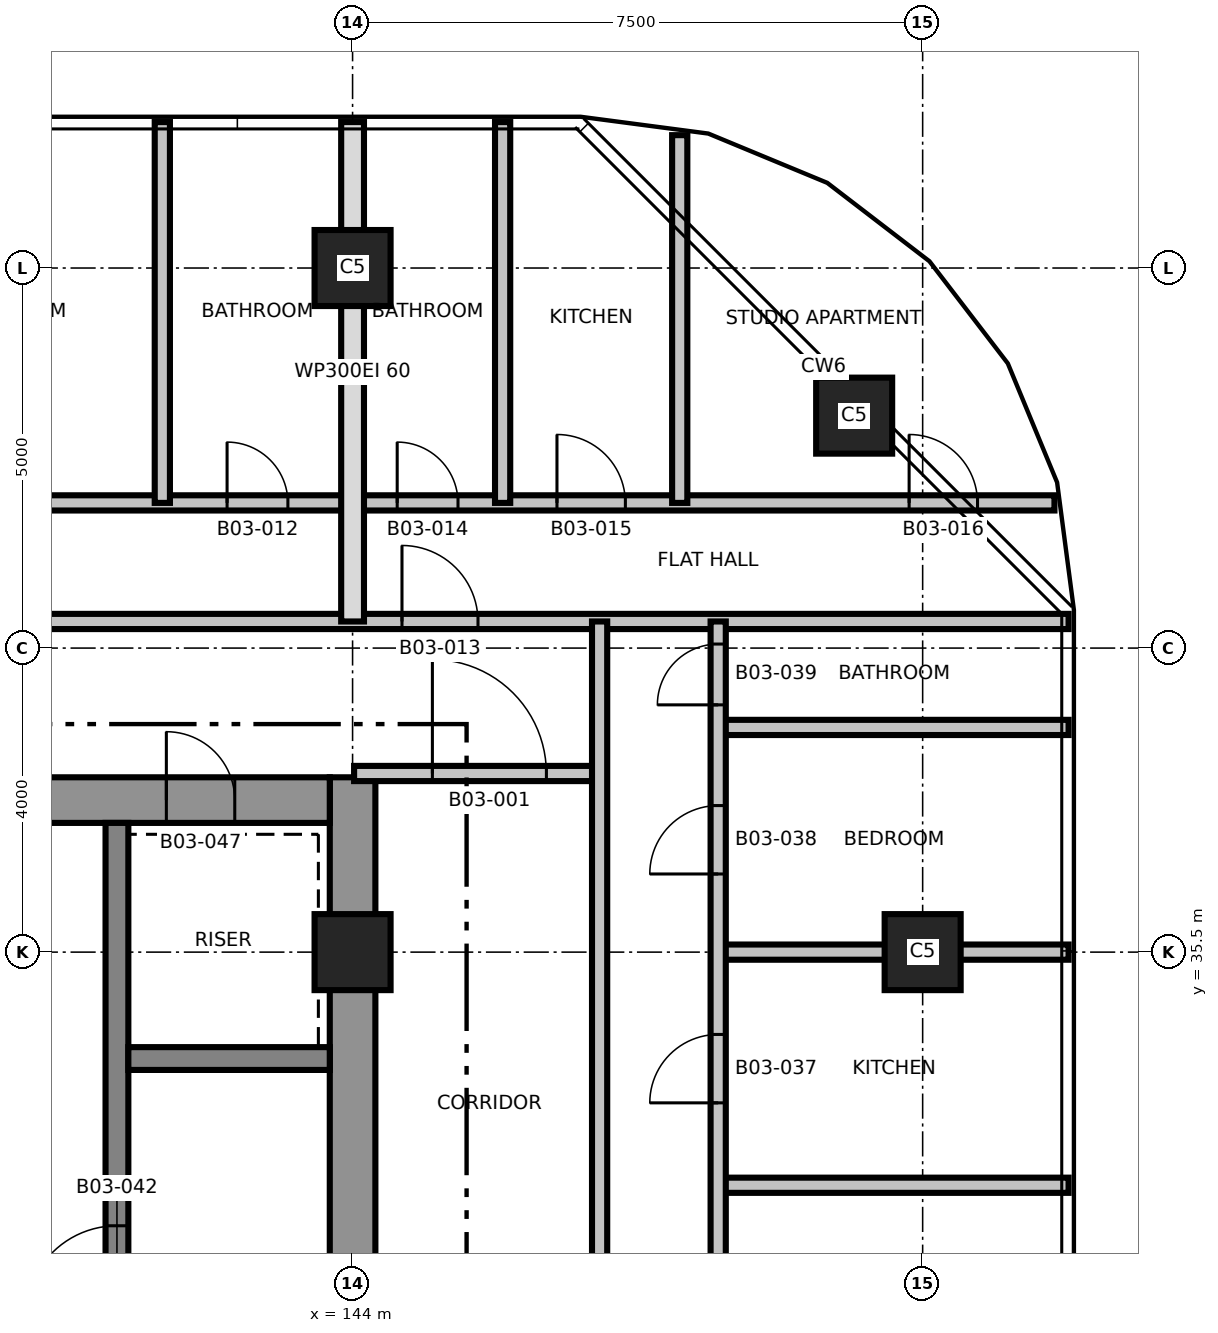
"""IFC4 building model, lengths in metres.
Left out: names, types, materials, properties, quantities, classifications, styles, units other than length and angle.
Written with IfcOpenShell. Run it as: python <this file> out.ifc"""

import sys

from ifc_helpers import new_model, si_unit, direction, frame, frame_2d, origin, origin_2d, place, context, subcontext, project, spatial, rectangle, extrude, element, fill, save


model = new_model("IFC4")
c1 = context("Model", 3, precision=1e-05, world=origin(), true_north=direction((0.0, 1.0)))
c2 = subcontext(c1, "Body", "Model", "MODEL_VIEW")
j1 = project(units=[si_unit("LENGTHUNIT", "METRE"), si_unit("PLANEANGLEUNIT", "RADIAN")], contexts=[c1])
p1 = place(None, origin())
s1 = spatial("IfcSite", under=j1, at=p1, CompositionType="ELEMENT")
p2 = place(p1, origin())
s2 = spatial("IfcBuilding", under=s1, at=p2, CompositionType="ELEMENT")
p3 = place(p2, frame((0.0, 0.0, 55.7)))
s3 = spatial("IfcBuildingStorey", under=s2, at=p3, CompositionType="ELEMENT", Elevation=55.7)
p4 = place(p3, frame((144.0, 24.2, 0.0), z_axis=(0.0, 0.0, 1.0), x_axis=(0.0, 1.0, 0.0)))
e1 = element("IfcWall", 1, at=p4, inside=s3, PredefinedType="SHEAR", context=c2, shape_type="SweptSolid", body=[
    extrude(rectangle(XDim=13.6, YDim=0.6, at=frame_2d((6.8, 0.0))), origin(), (0.0, 0.0, 1.0), 3.7),
])
p5 = place(p3, frame((128.7, 37.5, 0.0), z_axis=(0.0, 0.0, 1.0), x_axis=(1.0, 0.0, 0.0)))
e2 = element("IfcWall", 2, at=p5, inside=s3, PredefinedType="SHEAR", context=c2, shape_type="SweptSolid", body=[
    extrude(rectangle(XDim=15.0, YDim=0.6, at=frame_2d((7.5, 0.0))), origin(), (0.0, 0.0, 1.0), 3.7),
])
p6 = place(p5, frame((9.65, 0.0, 0.0)))
e3 = element("IfcOpeningElement", 3, at=p6, cuts=e2, PredefinedType="OPENING", context=c2, shape_type="SweptSolid", body=[
    extrude(rectangle(XDim=1.5, YDim=2.1, at=frame_2d((0.75, 1.05))), frame((0.0, 0.31, 0.0), z_axis=(0.0, -1.0, 0.0), x_axis=(1.0, 0.0, 0.0)), (0.0, 0.0, 1.0), 0.62),
])
p7 = place(p5, frame((12.85, 0.0, 0.0)))
e4 = element("IfcOpeningElement", 4, at=p7, cuts=e2, PredefinedType="OPENING", context=c2, shape_type="SweptSolid", body=[
    extrude(rectangle(XDim=0.9, YDim=2.1, at=frame_2d((0.45, 1.05))), frame((0.0, 0.31, 0.0), z_axis=(0.0, -1.0, 0.0), x_axis=(1.0, 0.0, 0.0)), (0.0, 0.0, 1.0), 0.62),
])
p8 = place(p5, frame((3.8, 0.0, 0.0)))
e5 = element("IfcOpeningElement", 5, at=p8, cuts=e2, PredefinedType="OPENING", context=c2, shape_type="SweptSolid", body=[
    extrude(rectangle(XDim=0.9, YDim=2.1, at=frame_2d((0.45, 1.05))), frame((0.0, 0.31, 0.0), z_axis=(0.0, -1.0, 0.0), x_axis=(1.0, 0.0, 0.0)), (0.0, 0.0, 1.0), 0.62),
])
p9 = place(p5, frame((6.7, 0.0, 0.0)))
e6 = element("IfcOpeningElement", 6, at=p9, cuts=e2, PredefinedType="OPENING", context=c2, shape_type="SweptSolid", body=[
    extrude(rectangle(XDim=0.9, YDim=2.1, at=frame_2d((0.45, 1.05))), frame((0.0, 0.31, 0.0), z_axis=(0.0, -1.0, 0.0), x_axis=(1.0, 0.0, 0.0)), (0.0, 0.0, 1.0), 0.62),
])
p10 = place(p3, frame((140.9, 24.8, 0.0), z_axis=(0.0, 0.0, 1.0), x_axis=(0.0, 1.0, 0.0)))
e7 = element("IfcWall", 7, at=p10, inside=s3, PredefinedType="SHEAR", context=c2, shape_type="SweptSolid", body=[
    extrude(rectangle(XDim=12.4, YDim=0.3, at=frame_2d((6.2, 0.0))), origin(), (0.0, 0.0, 1.0), 3.7),
])
p11 = place(p10, frame((5.9, 0.0, 0.0)))
e8 = element("IfcOpeningElement", 8, at=p11, cuts=e7, PredefinedType="OPENING", context=c2, shape_type="SweptSolid", body=[
    extrude(rectangle(XDim=1.2, YDim=2.1, at=frame_2d((0.6, 1.05))), frame((0.0, 0.16, 0.0), z_axis=(0.0, -1.0, 0.0), x_axis=(1.0, 0.0, 0.0)), (0.0, 0.0, 1.0), 0.32),
])
p12 = place(p3, frame((141.05, 34.1, 0.0), z_axis=(0.0, 0.0, 1.0), x_axis=(1.0, 0.0, 0.0)))
e9 = element("IfcWall", 9, at=p12, inside=s3, PredefinedType="SHEAR", context=c2, shape_type="SweptSolid", body=[
    extrude(rectangle(XDim=2.65, YDim=0.3, at=frame_2d((1.325, 0.0))), origin(), (0.0, 0.0, 1.0), 3.7),
])
for number, where, z_axis, x_axis in (
    (10, (144.0, 35.5, 0.0), (0.0, 0.0, 1.0), (1.0, 0.0, 0.0)),
    (11, (151.5, 35.5, 0.0), (0.0, 0.0, 1.0), (1.0, 0.0, 0.0)),
    (12, (150.599, 42.558, 0.0), (0.0, 0.0, 1.0), (1.0, 0.0, 0.0)),
    (13, (144.0, 44.5, 0.0), (0.0, 0.0, 1.0), (1.0, 0.0, 0.0)),
):
    element("IfcColumn", number, at=place(p3, frame(where, z_axis=z_axis, x_axis=x_axis)), inside=s3, PredefinedType="COLUMN", context=c2, shape_type="SweptSolid", body=[
        extrude(rectangle(XDim=1.0, YDim=1.0, at=origin_2d()), origin(), (0.0, 0.0, 1.0), 3.7),
    ])
for number, where, z_axis, x_axis in (
    (14, (148.81, 32.433, 0.0), (0.0, 0.0, 1.0), (1.0, 0.0, 0.0)),
    (15, (148.81, 35.5, 0.0), (0.0, 0.0, 1.0), (1.0, 0.0, 0.0)),
):
    element("IfcWall", number, at=place(p3, frame(where, z_axis=z_axis, x_axis=x_axis)), inside=s3, PredefinedType="PARTITIONING", context=c2, shape_type="SweptSolid", body=[
        extrude(rectangle(XDim=4.61, YDim=0.2, at=frame_2d((2.305, 0.0))), origin(), (0.0, 0.0, 1.0), 3.4),
    ])
p13 = place(p3, frame((144.02, 37.85, 0.0), z_axis=(0.0, 0.0, 1.0), x_axis=(1.0, 0.0, 0.0)))
e16 = element("IfcWall", 16, at=p13, inside=s3, PredefinedType="PARTITIONING", context=c2, shape_type="SweptSolid", body=[
    extrude(rectangle(XDim=3.23, YDim=0.2, at=frame_2d((1.615, 0.0))), origin(), (0.0, 0.0, 1.0), 3.4),
])
p14 = place(p13, frame((1.03, 0.0, 0.0)))
e17 = element("IfcOpeningElement", 17, at=p14, cuts=e16, PredefinedType="OPENING", context=c2, shape_type="SweptSolid", body=[
    extrude(rectangle(XDim=1.5, YDim=2.1, at=frame_2d((0.75, 1.05))), frame((0.0, 0.11, 0.0), z_axis=(0.0, -1.0, 0.0), x_axis=(1.0, 0.0, 0.0)), (0.0, 0.0, 1.0), 0.22),
])
p15 = place(p3, frame((148.81, 38.456, 0.0), z_axis=(0.0, 0.0, 1.0), x_axis=(1.0, 0.0, 0.0)))
e18 = element("IfcWall", 18, at=p15, inside=s3, PredefinedType="PARTITIONING", context=c2, shape_type="SweptSolid", body=[
    extrude(rectangle(XDim=4.61, YDim=0.2, at=frame_2d((2.305, 0.0))), origin(), (0.0, 0.0, 1.0), 3.4),
])
p16 = place(p3, frame((119.58, 39.85, 0.0), z_axis=(0.0, 0.0, 1.0), x_axis=(1.0, 0.0, 0.0)))
e19 = element("IfcWall", 19, at=p16, inside=s3, PredefinedType="PARTITIONING", context=c2, shape_type="SweptSolid", body=[
    extrude(rectangle(XDim=33.84, YDim=0.2, at=frame_2d((16.92, 0.0))), origin(), (0.0, 0.0, 1.0), 3.4),
])
p17 = place(p16, frame((15.27, 0.0, 0.0)))
e20 = element("IfcOpeningElement", 20, at=p17, cuts=e19, PredefinedType="OPENING", context=c2, shape_type="SweptSolid", body=[
    extrude(rectangle(XDim=1.0, YDim=2.1, at=frame_2d((0.5, 1.05))), frame((0.0, 0.11, 0.0), z_axis=(0.0, -1.0, 0.0), x_axis=(1.0, 0.0, 0.0)), (0.0, 0.0, 1.0), 0.22),
])
p18 = place(p16, frame((25.07, 0.0, 0.0)))
e21 = element("IfcOpeningElement", 21, at=p18, cuts=e19, PredefinedType="OPENING", context=c2, shape_type="SweptSolid", body=[
    extrude(rectangle(XDim=1.0, YDim=2.1, at=frame_2d((0.5, 1.05))), frame((0.0, 0.11, 0.0), z_axis=(0.0, -1.0, 0.0), x_axis=(1.0, 0.0, 0.0)), (0.0, 0.0, 1.0), 0.22),
])
p19 = place(p3, frame((119.766, 41.41, 0.0), z_axis=(0.0, 0.0, 1.0), x_axis=(1.0, 0.0, 0.0)))
e22 = element("IfcWall", 22, at=p19, inside=s3, PredefinedType="PARTITIONING", context=c2, shape_type="SweptSolid", body=[
    extrude(rectangle(XDim=33.468, YDim=0.2, at=frame_2d((16.734, 0.0))), origin(), (0.0, 0.0, 1.0), 3.4),
])
p20 = place(p19, frame((1.017, 0.0, 0.0)))
e23 = element("IfcOpeningElement", 23, at=p20, cuts=e22, PredefinedType="OPENING", context=c2, shape_type="SweptSolid", body=[
    extrude(rectangle(XDim=0.9, YDim=2.1, at=frame_2d((0.45, 1.05))), frame((0.0, 0.11, 0.0), z_axis=(0.0, -1.0, 0.0), x_axis=(1.0, 0.0, 0.0)), (0.0, 0.0, 1.0), 0.22),
])
p21 = place(p19, frame((4.888, 0.0, 0.0)))
e24 = element("IfcOpeningElement", 24, at=p21, cuts=e22, PredefinedType="OPENING", context=c2, shape_type="SweptSolid", body=[
    extrude(rectangle(XDim=0.9, YDim=2.1, at=frame_2d((0.45, 1.05))), frame((0.0, 0.11, 0.0), z_axis=(0.0, -1.0, 0.0), x_axis=(1.0, 0.0, 0.0)), (0.0, 0.0, 1.0), 0.22),
])
p22 = place(p19, frame((7.835, 0.0, 0.0)))
e25 = element("IfcOpeningElement", 25, at=p22, cuts=e22, PredefinedType="OPENING", context=c2, shape_type="SweptSolid", body=[
    extrude(rectangle(XDim=0.8, YDim=2.1, at=frame_2d((0.4, 1.05))), frame((0.0, 0.11, 0.0), z_axis=(0.0, -1.0, 0.0), x_axis=(1.0, 0.0, 0.0)), (0.0, 0.0, 1.0), 0.22),
])
p23 = place(p19, frame((11.251, 0.0, 0.0)))
e26 = element("IfcOpeningElement", 26, at=p23, cuts=e22, PredefinedType="OPENING", context=c2, shape_type="SweptSolid", body=[
    extrude(rectangle(XDim=0.9, YDim=2.1, at=frame_2d((0.45, 1.05))), frame((0.0, 0.11, 0.0), z_axis=(0.0, -1.0, 0.0), x_axis=(1.0, 0.0, 0.0)), (0.0, 0.0, 1.0), 0.22),
])
p24 = place(p19, frame((15.001, 0.0, 0.0)))
e27 = element("IfcOpeningElement", 27, at=p24, cuts=e22, PredefinedType="OPENING", context=c2, shape_type="SweptSolid", body=[
    extrude(rectangle(XDim=0.9, YDim=2.1, at=frame_2d((0.45, 1.05))), frame((0.0, 0.11, 0.0), z_axis=(0.0, -1.0, 0.0), x_axis=(1.0, 0.0, 0.0)), (0.0, 0.0, 1.0), 0.22),
])
p25 = place(p19, frame((18.783, 0.0, 0.0)))
e28 = element("IfcOpeningElement", 28, at=p25, cuts=e22, PredefinedType="OPENING", context=c2, shape_type="SweptSolid", body=[
    extrude(rectangle(XDim=0.9, YDim=2.1, at=frame_2d((0.45, 1.05))), frame((0.0, 0.11, 0.0), z_axis=(0.0, -1.0, 0.0), x_axis=(1.0, 0.0, 0.0)), (0.0, 0.0, 1.0), 0.22),
])
p26 = place(p19, frame((22.583, 0.0, 0.0)))
e29 = element("IfcOpeningElement", 29, at=p26, cuts=e22, PredefinedType="OPENING", context=c2, shape_type="SweptSolid", body=[
    extrude(rectangle(XDim=0.8, YDim=2.1, at=frame_2d((0.4, 1.05))), frame((0.0, 0.11, 0.0), z_axis=(0.0, -1.0, 0.0), x_axis=(1.0, 0.0, 0.0)), (0.0, 0.0, 1.0), 0.22),
])
p27 = place(p19, frame((24.821, 0.0, 0.0)))
e30 = element("IfcOpeningElement", 30, at=p27, cuts=e22, PredefinedType="OPENING", context=c2, shape_type="SweptSolid", body=[
    extrude(rectangle(XDim=0.8, YDim=2.1, at=frame_2d((0.4, 1.05))), frame((0.0, 0.11, 0.0), z_axis=(0.0, -1.0, 0.0), x_axis=(1.0, 0.0, 0.0)), (0.0, 0.0, 1.0), 0.22),
])
p28 = place(p19, frame((26.923, 0.0, 0.0)))
e31 = element("IfcOpeningElement", 31, at=p28, cuts=e22, PredefinedType="OPENING", context=c2, shape_type="SweptSolid", body=[
    extrude(rectangle(XDim=0.9, YDim=2.1, at=frame_2d((0.45, 1.05))), frame((0.0, 0.11, 0.0), z_axis=(0.0, -1.0, 0.0), x_axis=(1.0, 0.0, 0.0)), (0.0, 0.0, 1.0), 0.22),
])
p29 = place(p19, frame((31.556, 0.0, 0.0)))
e32 = element("IfcOpeningElement", 32, at=p29, cuts=e22, PredefinedType="OPENING", context=c2, shape_type="SweptSolid", body=[
    extrude(rectangle(XDim=0.9, YDim=2.1, at=frame_2d((0.45, 1.05))), frame((0.0, 0.11, 0.0), z_axis=(0.0, -1.0, 0.0), x_axis=(1.0, 0.0, 0.0)), (0.0, 0.0, 1.0), 0.22),
])
p30 = place(p3, frame((141.497, 41.41, 0.0), z_axis=(0.0, 0.0, 1.0), x_axis=(0.0, 1.0, 0.0)))
e33 = element("IfcWall", 33, at=p30, inside=s3, PredefinedType="PARTITIONING", context=c2, shape_type="SweptSolid", body=[
    extrude(rectangle(XDim=5.01, YDim=0.2, at=frame_2d((2.505, 0.0))), origin(), (0.0, 0.0, 1.0), 3.4),
])
p31 = place(p3, frame((144.0, 39.85, 0.0), z_axis=(0.0, 0.0, 1.0), x_axis=(0.0, 1.0, 0.0)))
e34 = element("IfcWall", 34, at=p31, inside=s3, PredefinedType="PARTITIONING", context=c2, shape_type="SweptSolid", body=[
    extrude(rectangle(XDim=6.57, YDim=0.3, at=frame_2d((3.285, 0.0))), origin(), (0.0, 0.0, 1.0), 3.4),
])
p32 = place(p3, frame((145.974, 41.41, 0.0), z_axis=(0.0, 0.0, 1.0), x_axis=(0.0, 1.0, 0.0)))
e35 = element("IfcWall", 35, at=p32, inside=s3, PredefinedType="PARTITIONING", context=c2, shape_type="SweptSolid", body=[
    extrude(rectangle(XDim=5.01, YDim=0.2, at=frame_2d((2.505, 0.0))), origin(), (0.0, 0.0, 1.0), 3.4),
])
p33 = place(p3, frame((147.25, 22.15, 0.0), z_axis=(0.0, 0.0, 1.0), x_axis=(0.0, 1.0, 0.0)))
e36 = element("IfcWall", 36, at=p33, inside=s3, PredefinedType="PARTITIONING", context=c2, shape_type="SweptSolid", body=[
    extrude(rectangle(XDim=17.7, YDim=0.2, at=frame_2d((8.85, 0.0))), origin(), (0.0, 0.0, 1.0), 3.4),
])
p34 = place(p33, frame((2.65, 0.0, 0.0)))
e37 = element("IfcOpeningElement", 37, at=p34, cuts=e36, PredefinedType="OPENING", context=c2, shape_type="SweptSolid", body=[
    extrude(rectangle(XDim=1.0, YDim=2.1, at=frame_2d((0.5, 1.05))), frame((0.0, 0.11, 0.0), z_axis=(0.0, -1.0, 0.0), x_axis=(1.0, 0.0, 0.0)), (0.0, 0.0, 1.0), 0.22),
])
p35 = place(p3, frame((148.304, 41.41, 0.0), z_axis=(0.0, 0.0, 1.0), x_axis=(0.0, 1.0, 0.0)))
e38 = element("IfcWall", 38, at=p35, inside=s3, PredefinedType="PARTITIONING", context=c2, shape_type="SweptSolid", body=[
    extrude(rectangle(XDim=4.838, YDim=0.2, at=frame_2d((2.419, 0.0))), origin(), (0.0, 0.0, 1.0), 3.4),
])
p36 = place(p3, frame((148.81, 22.15, 0.0), z_axis=(0.0, 0.0, 1.0), x_axis=(0.0, 1.0, 0.0)))
e39 = element("IfcWall", 39, at=p36, inside=s3, PredefinedType="PARTITIONING", context=c2, shape_type="SweptSolid", body=[
    extrude(rectangle(XDim=17.7, YDim=0.2, at=frame_2d((8.85, 0.0))), origin(), (0.0, 0.0, 1.0), 3.4),
])
p37 = place(p36, frame((1.725, 0.0, 0.0)))
e40 = element("IfcOpeningElement", 40, at=p37, cuts=e39, PredefinedType="OPENING", context=c2, shape_type="SweptSolid", body=[
    extrude(rectangle(XDim=0.9, YDim=2.1, at=frame_2d((0.45, 1.05))), frame((0.0, 0.11, 0.0), z_axis=(0.0, -1.0, 0.0), x_axis=(1.0, 0.0, 0.0)), (0.0, 0.0, 1.0), 0.22),
])
p38 = place(p36, frame((6.867, 0.0, 0.0)))
e41 = element("IfcOpeningElement", 41, at=p38, cuts=e39, PredefinedType="OPENING", context=c2, shape_type="SweptSolid", body=[
    extrude(rectangle(XDim=0.9, YDim=2.1, at=frame_2d((0.45, 1.05))), frame((0.0, 0.11, 0.0), z_axis=(0.0, -1.0, 0.0), x_axis=(1.0, 0.0, 0.0)), (0.0, 0.0, 1.0), 0.22),
])
p39 = place(p36, frame((11.367, 0.0, 0.0)))
e42 = element("IfcOpeningElement", 42, at=p39, cuts=e39, PredefinedType="OPENING", context=c2, shape_type="SweptSolid", body=[
    extrude(rectangle(XDim=0.9, YDim=2.1, at=frame_2d((0.45, 1.05))), frame((0.0, 0.11, 0.0), z_axis=(0.0, -1.0, 0.0), x_axis=(1.0, 0.0, 0.0)), (0.0, 0.0, 1.0), 0.22),
])
p40 = place(p36, frame((14.378, 0.0, 0.0)))
e43 = element("IfcOpeningElement", 43, at=p40, cuts=e39, PredefinedType="OPENING", context=c2, shape_type="SweptSolid", body=[
    extrude(rectangle(XDim=0.9, YDim=2.1, at=frame_2d((0.45, 1.05))), frame((0.0, 0.11, 0.0), z_axis=(0.0, -1.0, 0.0), x_axis=(1.0, 0.0, 0.0)), (0.0, 0.0, 1.0), 0.22),
])
p41 = place(p36, frame((16.603, 0.0, 0.0)))
e44 = element("IfcOpeningElement", 44, at=p41, cuts=e39, PredefinedType="OPENING", context=c2, shape_type="SweptSolid", body=[
    extrude(rectangle(XDim=0.8, YDim=2.1, at=frame_2d((0.4, 1.05))), frame((0.0, 0.11, 0.0), z_axis=(0.0, -1.0, 0.0), x_axis=(1.0, 0.0, 0.0)), (0.0, 0.0, 1.0), 0.22),
])
p42 = place(p14, origin())
e45 = element("IfcDoor", 45, at=p42, inside=s3, OperationType="SINGLE_SWING_LEFT", PredefinedType="DOOR", context=c2, shape_type="SweptSolid", body=[
    extrude(rectangle(XDim=1.5, YDim=2.1, at=frame_2d((0.75, 1.05))), frame((0.0, 0.025, 0.0), z_axis=(0.0, -1.0, 0.0), x_axis=(1.0, 0.0, 0.0)), (0.0, 0.0, 1.0), 0.05),
])
fill(e17, e45)
p43 = place(p26, origin())
e46 = element("IfcDoor", 46, at=p43, inside=s3, OperationType="SINGLE_SWING_RIGHT", PredefinedType="DOOR", context=c2, shape_type="SweptSolid", body=[
    extrude(rectangle(XDim=0.8, YDim=2.1, at=frame_2d((0.4, 1.05))), frame((0.0, 0.025, 0.0), z_axis=(0.0, -1.0, 0.0), x_axis=(1.0, 0.0, 0.0)), (0.0, 0.0, 1.0), 0.05),
])
fill(e29, e46)
p44 = place(p18, origin())
e47 = element("IfcDoor", 47, at=p44, inside=s3, OperationType="SINGLE_SWING_LEFT", PredefinedType="DOOR", context=c2, shape_type="SweptSolid", body=[
    extrude(rectangle(XDim=1.0, YDim=2.1, at=frame_2d((0.5, 1.05))), frame((0.0, 0.025, 0.0), z_axis=(0.0, -1.0, 0.0), x_axis=(1.0, 0.0, 0.0)), (0.0, 0.0, 1.0), 0.05),
])
fill(e21, e47)
p45 = place(p27, origin())
e48 = element("IfcDoor", 48, at=p45, inside=s3, OperationType="SINGLE_SWING_RIGHT", PredefinedType="DOOR", context=c2, shape_type="SweptSolid", body=[
    extrude(rectangle(XDim=0.8, YDim=2.1, at=frame_2d((0.4, 1.05))), frame((0.0, 0.025, 0.0), z_axis=(0.0, -1.0, 0.0), x_axis=(1.0, 0.0, 0.0)), (0.0, 0.0, 1.0), 0.05),
])
fill(e30, e48)
p46 = place(p28, origin())
e49 = element("IfcDoor", 49, at=p46, inside=s3, OperationType="SINGLE_SWING_LEFT", PredefinedType="DOOR", context=c2, shape_type="SweptSolid", body=[
    extrude(rectangle(XDim=0.9, YDim=2.1, at=frame_2d((0.45, 1.05))), frame((0.0, 0.025, 0.0), z_axis=(0.0, -1.0, 0.0), x_axis=(1.0, 0.0, 0.0)), (0.0, 0.0, 1.0), 0.05),
])
fill(e31, e49)
p47 = place(p29, origin())
e50 = element("IfcDoor", 50, at=p47, inside=s3, OperationType="SINGLE_SWING_RIGHT", PredefinedType="DOOR", context=c2, shape_type="SweptSolid", body=[
    extrude(rectangle(XDim=0.9, YDim=2.1, at=frame_2d((0.45, 1.05))), frame((0.0, 0.025, 0.0), z_axis=(0.0, -1.0, 0.0), x_axis=(1.0, 0.0, 0.0)), (0.0, 0.0, 1.0), 0.05),
])
fill(e32, e50)
p48 = place(p39, origin())
e51 = element("IfcDoor", 51, at=p48, inside=s3, OperationType="SINGLE_SWING_LEFT", PredefinedType="DOOR", context=c2, shape_type="SweptSolid", body=[
    extrude(rectangle(XDim=0.9, YDim=2.1, at=frame_2d((0.45, 1.05))), frame((0.0, 0.025, 0.0), z_axis=(0.0, -1.0, 0.0), x_axis=(1.0, 0.0, 0.0)), (0.0, 0.0, 1.0), 0.05),
])
fill(e42, e51)
p49 = place(p40, origin())
e52 = element("IfcDoor", 52, at=p49, inside=s3, OperationType="SINGLE_SWING_RIGHT", PredefinedType="DOOR", context=c2, shape_type="SweptSolid", body=[
    extrude(rectangle(XDim=0.9, YDim=2.1, at=frame_2d((0.45, 1.05))), frame((0.0, 0.025, 0.0), z_axis=(0.0, -1.0, 0.0), x_axis=(1.0, 0.0, 0.0)), (0.0, 0.0, 1.0), 0.05),
])
fill(e43, e52)
p50 = place(p41, origin())
e53 = element("IfcDoor", 53, at=p50, inside=s3, OperationType="SINGLE_SWING_LEFT", PredefinedType="DOOR", context=c2, shape_type="SweptSolid", body=[
    extrude(rectangle(XDim=0.8, YDim=2.1, at=frame_2d((0.4, 1.05))), frame((0.0, 0.025, 0.0), z_axis=(0.0, -1.0, 0.0), x_axis=(1.0, 0.0, 0.0)), (0.0, 0.0, 1.0), 0.05),
])
fill(e44, e53)
p51 = place(p11, origin())
e54 = element("IfcDoor", 54, at=p51, inside=s3, OperationType="SINGLE_SWING_RIGHT", PredefinedType="DOOR", context=c2, shape_type="SweptSolid", body=[
    extrude(rectangle(XDim=1.2, YDim=2.1, at=frame_2d((0.6, 1.05))), frame((0.0, 0.025, 0.0), z_axis=(0.0, -1.0, 0.0), x_axis=(1.0, 0.0, 0.0)), (0.0, 0.0, 1.0), 0.05),
])
fill(e8, e54)
p52 = place(p7, origin())
e55 = element("IfcDoor", 55, at=p52, inside=s3, OperationType="SINGLE_SWING_RIGHT", PredefinedType="DOOR", context=c2, shape_type="SweptSolid", body=[
    extrude(rectangle(XDim=0.9, YDim=2.1, at=frame_2d((0.45, 1.05))), frame((0.0, 0.025, 0.0), z_axis=(0.0, -1.0, 0.0), x_axis=(1.0, 0.0, 0.0)), (0.0, 0.0, 1.0), 0.05),
])
fill(e4, e55)
save(model, sys.argv[1])
